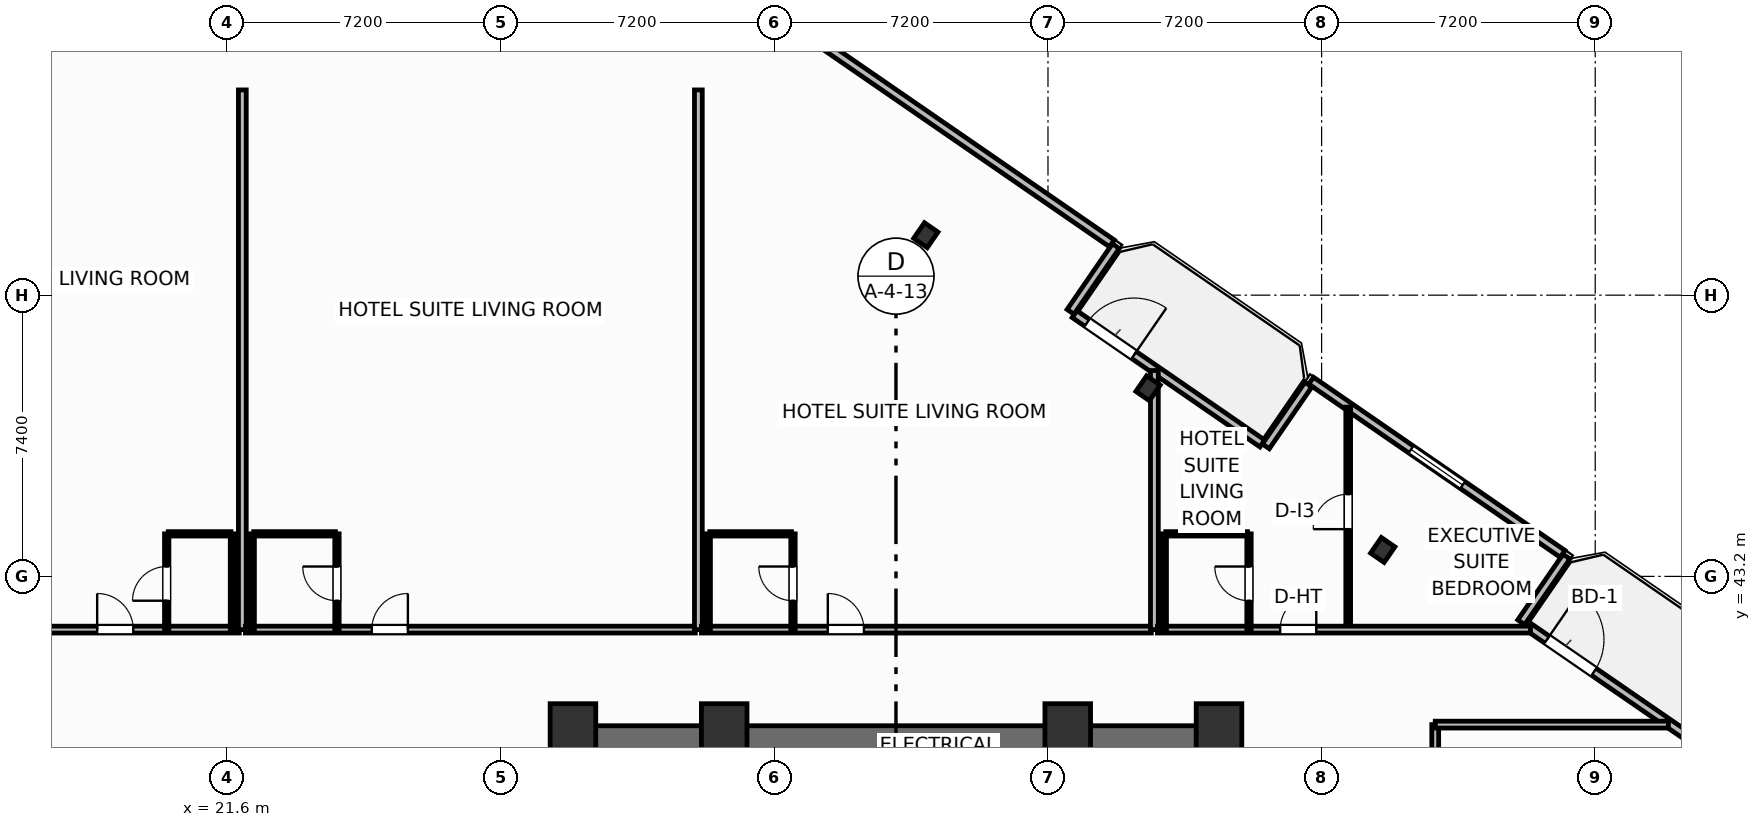
"""IFC4 building model, lengths in metres.
Left out: names, types, materials, properties, quantities, classifications, styles, units other than length and angle.
Written with IfcOpenShell. Run it as: python <this file> out.ifc"""

import sys

from ifc_helpers import new_model, si_unit, direction, frame, frame_2d, origin, origin_2d, place, context, subcontext, project, spatial, rectangle, i_section, extrude, element, fill, save


model = new_model("IFC4")
c1 = context("Model", 3, precision=1e-05, world=origin(), true_north=direction((0.0, 1.0)))
c2 = subcontext(c1, "Body", "Model", "MODEL_VIEW")
j1 = project(units=[si_unit("LENGTHUNIT", "METRE"), si_unit("PLANEANGLEUNIT", "RADIAN")], contexts=[c1])
p1 = place(None, origin())
s1 = spatial("IfcSite", under=j1, at=p1, CompositionType="ELEMENT")
p2 = place(p1, origin())
s2 = spatial("IfcBuilding", under=s1, at=p2, CompositionType="ELEMENT")
p3 = place(p2, frame((0.0, 0.0, 49.2)))
s3 = spatial("IfcBuildingStorey", under=s2, at=p3, CompositionType="ELEMENT", Elevation=49.2)
for number, where, z_axis, x_axis in (
    (1, (30.7, 39.05, 0.0), (0.0, 0.0, 1.0), (1.0, 0.0, 0.0)),
    (2, (34.68, 39.05, 0.0), (0.0, 0.0, 1.0), (1.0, 0.0, 0.0)),
    (3, (43.72, 39.05, 0.0), (0.0, 0.0, 1.0), (1.0, 0.0, 0.0)),
    (4, (47.7, 39.05, 0.0), (0.0, 0.0, 1.0), (1.0, 0.0, 0.0)),
):
    element("IfcColumn", number, at=place(p3, frame(where, z_axis=z_axis, x_axis=x_axis)), inside=s3, PredefinedType="COLUMN", context=c2, shape_type="SweptSolid", body=[
        extrude(rectangle(XDim=1.2, YDim=1.6, at=origin_2d()), origin(), (0.0, 0.0, 1.0), 3.7),
    ])
p4 = place(p3, frame((30.28, 38.845, 0.0), z_axis=(0.0, 0.0, 1.0), x_axis=(1.0, 0.0, 0.0)))
e5 = element("IfcWall", 5, at=p4, inside=s3, PredefinedType="SHEAR", context=c2, shape_type="SweptSolid", body=[
    extrude(rectangle(XDim=17.84, YDim=0.85, at=frame_2d((8.92, 0.0))), origin(), (0.0, 0.0, 1.0), 3.45),
])
for number, where, z_axis, x_axis in (
    (6, (52.009, 43.896, 0.0), (0.0, 0.0, 1.0), (0.824, -0.567, 0.0)),
    (7, (45.833, 48.15, 0.0), (0.0, 0.0, 1.0), (0.824, -0.567, 0.0)),
    (8, (39.985, 52.177, 0.0), (0.0, 0.0, 1.0), (0.824, -0.567, 0.0)),
):
    element("IfcColumn", number, at=place(p3, frame(where, z_axis=z_axis, x_axis=x_axis)), inside=s3, PredefinedType="COLUMN", context=c2, shape_type="SweptSolid", body=[
        extrude(i_section(OverallWidth=0.432, OverallDepth=0.498, WebThickness=0.056, FlangeThickness=0.089, FilletRadius=0.025, at=origin_2d()), origin(), (0.0, 0.0, 1.0), 3.7),
    ])
p5 = place(p3, frame((43.898, 50.102, 0.0), z_axis=(0.0, 0.0, 1.0), x_axis=(0.823534636215, -0.567265989598, 0.0)))
e9 = element("IfcWall", 9, at=p5, inside=s3, PredefinedType="SOLIDWALL", context=c2, shape_type="SweptSolid", body=[
    extrude(rectangle(XDim=6.0, YDim=0.22, at=frame_2d((3.0, 0.0))), origin(), (0.0, 0.0, 1.0), 2.73),
])
p6 = place(p5, frame((0.4, 0.0, 0.0)))
e10 = element("IfcOpeningElement", 10, at=p6, cuts=e9, PredefinedType="OPENING", context=c2, shape_type="SweptSolid", body=[
    extrude(rectangle(XDim=1.5, YDim=2.25, at=frame_2d((0.75, 1.125))), frame((0.0, 0.12, 0.0), z_axis=(0.0, -1.0, 0.0), x_axis=(1.0, 0.0, 0.0)), (0.0, 0.0, 1.0), 0.24),
])
p7 = place(p3, frame((55.757, 41.933, 0.0), z_axis=(0.0, 0.0, 1.0), x_axis=(0.823534636215, -0.567265989598, 0.0)))
e11 = element("IfcWall", 11, at=p7, inside=s3, PredefinedType="SOLIDWALL", context=c2, shape_type="SweptSolid", body=[
    extrude(rectangle(XDim=6.0, YDim=0.22, at=frame_2d((3.0, 0.0))), origin(), (0.0, 0.0, 1.0), 2.73),
])
p8 = place(p7, frame((0.696, 0.0, 0.0)))
e12 = element("IfcOpeningElement", 12, at=p8, cuts=e11, PredefinedType="OPENING", context=c2, shape_type="SweptSolid", body=[
    extrude(rectangle(XDim=1.5, YDim=2.25, at=frame_2d((0.75, 1.125))), frame((0.0, 0.12, 0.0), z_axis=(0.0, -1.0, 0.0), x_axis=(1.0, 0.0, 0.0)), (0.0, 0.0, 1.0), 0.24),
])
p9 = place(p3, frame((55.653, 41.993, 0.0), z_axis=(0.0, 0.0, 1.0), x_axis=(0.567273696173, 0.823529327729, 0.0)))
e13 = element("IfcWall", 13, at=p9, inside=s3, PredefinedType="SOLIDWALL", context=c2, shape_type="SweptSolid", body=[
    extrude(rectangle(XDim=2.1, YDim=0.22, at=frame_2d((1.05, 0.0))), origin(), (0.0, 0.0, 1.0), 2.73),
])
p10 = place(p3, frame((56.741, 43.793, 0.0), z_axis=(0.0, 0.0, 1.0), x_axis=(-0.823530942962, 0.56727135128, 0.0)))
e14 = element("IfcWall", 14, at=p10, inside=s3, PredefinedType="SOLIDWALL", context=c2, shape_type="SweptSolid", body=[
    extrude(rectangle(XDim=8.035, YDim=0.22, at=frame_2d((4.018, 0.0))), origin(), (0.0, 0.0, 1.0), 2.73),
])
p11 = place(p10, frame((3.192, 0.0, 0.8)))
e15 = element("IfcOpeningElement", 15, at=p11, cuts=e14, PredefinedType="OPENING", context=c2, shape_type="SweptSolid", body=[
    extrude(rectangle(XDim=1.65, YDim=1.65, at=frame_2d((0.825, 0.825))), frame((0.0, 0.12, 0.0), z_axis=(0.0, -1.0, 0.0), x_axis=(1.0, 0.0, 0.0)), (0.0, 0.0, 1.0), 0.24),
])
p12 = place(p3, frame((50.053, 48.248, 0.0), z_axis=(0.0, 0.0, 1.0), x_axis=(-0.567273565974, -0.823529417415, 0.0)))
e16 = element("IfcWall", 16, at=p12, inside=s3, PredefinedType="SOLIDWALL", context=c2, shape_type="SweptSolid", body=[
    extrude(rectangle(XDim=1.975, YDim=0.22, at=frame_2d((0.988, 0.0))), origin(), (0.0, 0.0, 1.0), 2.73),
])
p13 = place(p3, frame((43.794, 50.161, 0.0), z_axis=(0.0, 0.0, 1.0), x_axis=(0.567352541689, 0.823475010816, 0.0)))
e17 = element("IfcWall", 17, at=p13, inside=s3, PredefinedType="SOLIDWALL", context=c2, shape_type="SweptSolid", body=[
    extrude(rectangle(XDim=2.1, YDim=0.22, at=frame_2d((1.05, 0.0))), origin(), (0.0, 0.0, 1.0), 2.73),
])
p14 = place(p3, frame((44.882, 51.962, 0.0), z_axis=(0.0, 0.0, 1.0), x_axis=(-0.823534427573, 0.567266292497, 0.0)))
e18 = element("IfcWall", 18, at=p14, inside=s3, PredefinedType="SOLIDWALL", context=c2, shape_type="SweptSolid", body=[
    extrude(rectangle(XDim=23.147, YDim=0.22, at=frame_2d((11.574, 0.0))), origin(), (0.0, 0.0, 1.0), 2.73),
])
p15 = place(p14, frame((10.749, 0.0, 0.8)))
e19 = element("IfcOpeningElement", 19, at=p15, cuts=e18, PredefinedType="OPENING", context=c2, shape_type="SweptSolid", body=[
    extrude(rectangle(XDim=1.65, YDim=1.65, at=frame_2d((0.825, 0.825))), frame((0.0, 0.12, 0.0), z_axis=(0.0, -1.0, 0.0), x_axis=(1.0, 0.0, 0.0)), (0.0, 0.0, 1.0), 0.24),
])
p16 = place(p3, frame((3.176, 41.8, 0.0), z_axis=(0.0, 0.0, 1.0), x_axis=(1.0, 0.0, 0.0)))
e20 = element("IfcWall", 20, at=p16, inside=s3, PredefinedType="PARTITIONING", context=c2, shape_type="SweptSolid", body=[
    extrude(rectangle(XDim=18.744, YDim=0.18, at=frame_2d((9.372, 0.0))), origin(), (0.0, 0.0, 1.0), 3.45),
])
p17 = place(p16, frame((15.004, 0.0, 0.0)))
e21 = element("IfcOpeningElement", 21, at=p17, cuts=e20, PredefinedType="OPENING", context=c2, shape_type="SweptSolid", body=[
    extrude(rectangle(XDim=0.95, YDim=2.15, at=frame_2d((0.475, 1.075))), frame((0.0, 0.1, 0.0), z_axis=(0.0, -1.0, 0.0), x_axis=(1.0, 0.0, 0.0)), (0.0, 0.0, 1.0), 0.2),
])
p18 = place(p3, frame((20.05, 44.32, 0.0), z_axis=(0.0, 0.0, 1.0), x_axis=(1.0, 0.0, 0.0)))
e22 = element("IfcWall", 22, at=p18, inside=s3, PredefinedType="PARTITIONING", context=c2, shape_type="SweptSolid", body=[
    extrude(rectangle(XDim=1.65, YDim=0.115, at=frame_2d((0.825, 0.0))), origin(), (0.0, 0.0, 1.0), 3.45),
])
p19 = place(p3, frame((20.01, 41.8, 0.0), z_axis=(0.0, 0.0, 1.0), x_axis=(0.0, 1.0, 0.0)))
e23 = element("IfcWall", 23, at=p19, inside=s3, PredefinedType="PARTITIONING", context=c2, shape_type="SweptSolid", body=[
    extrude(rectangle(XDim=2.52, YDim=0.115, at=frame_2d((1.26, 0.0))), origin(), (0.0, 0.0, 1.0), 3.45),
])
p20 = place(p19, frame((0.76, 0.0, 0.0)))
e24 = element("IfcOpeningElement", 24, at=p20, cuts=e23, PredefinedType="OPENING", context=c2, shape_type="SweptSolid", body=[
    extrude(rectangle(XDim=0.9, YDim=2.05, at=frame_2d((0.45, 1.025))), frame((0.0, 0.067, 0.0), z_axis=(0.0, -1.0, 0.0), x_axis=(1.0, 0.0, 0.0)), (0.0, 0.0, 1.0), 0.135),
])
p21 = place(p3, frame((21.74, 41.8, 0.0), z_axis=(0.0, 0.0, 1.0), x_axis=(0.0, 1.0, 0.0)))
e25 = element("IfcWall", 25, at=p21, inside=s3, PredefinedType="PARTITIONING", context=c2, shape_type="SweptSolid", body=[
    extrude(rectangle(XDim=2.52, YDim=0.115, at=frame_2d((1.26, 0.0))), origin(), (0.0, 0.0, 1.0), 3.45),
])
p22 = place(p3, frame((22.0, 41.8, 0.0), z_axis=(0.0, 0.0, 1.0), x_axis=(0.0, 1.0, 0.0)))
e26 = element("IfcWall", 26, at=p22, inside=s3, PredefinedType="PARTITIONING", context=c2, shape_type="SweptSolid", body=[
    extrude(rectangle(XDim=14.2, YDim=0.205, at=frame_2d((7.1, 0.0))), origin(), (0.0, 0.0, 1.0), 3.45),
])
p23 = place(p3, frame((22.08, 41.8, 0.0), z_axis=(0.0, 0.0, 1.0), x_axis=(1.0, 0.0, 0.0)))
e27 = element("IfcWall", 27, at=p23, inside=s3, PredefinedType="PARTITIONING", context=c2, shape_type="SweptSolid", body=[
    extrude(rectangle(XDim=11.84, YDim=0.18, at=frame_2d((5.92, 0.0))), origin(), (0.0, 0.0, 1.0), 3.45),
])
p24 = place(p23, frame((3.326, 0.0, 0.0)))
e28 = element("IfcOpeningElement", 28, at=p24, cuts=e27, PredefinedType="OPENING", context=c2, shape_type="SweptSolid", body=[
    extrude(rectangle(XDim=0.95, YDim=2.15, at=frame_2d((0.475, 1.075))), frame((0.0, 0.1, 0.0), z_axis=(0.0, -1.0, 0.0), x_axis=(1.0, 0.0, 0.0)), (0.0, 0.0, 1.0), 0.2),
])
p25 = place(p3, frame((22.3, 44.32, 0.0), z_axis=(0.0, 0.0, 1.0), x_axis=(1.0, 0.0, 0.0)))
e29 = element("IfcWall", 29, at=p25, inside=s3, PredefinedType="PARTITIONING", context=c2, shape_type="SweptSolid", body=[
    extrude(rectangle(XDim=2.15, YDim=0.115, at=frame_2d((1.075, 0.0))), origin(), (0.0, 0.0, 1.0), 3.45),
])
p26 = place(p3, frame((24.49, 41.8, 0.0), z_axis=(0.0, 0.0, 1.0), x_axis=(0.0, 1.0, 0.0)))
e30 = element("IfcWall", 30, at=p26, inside=s3, PredefinedType="PARTITIONING", context=c2, shape_type="SweptSolid", body=[
    extrude(rectangle(XDim=2.52, YDim=0.115, at=frame_2d((1.26, 0.0))), origin(), (0.0, 0.0, 1.0), 3.45),
])
p27 = place(p26, frame((0.76, 0.0, 0.0)))
e31 = element("IfcOpeningElement", 31, at=p27, cuts=e30, PredefinedType="OPENING", context=c2, shape_type="SweptSolid", body=[
    extrude(rectangle(XDim=0.9, YDim=2.05, at=frame_2d((0.45, 1.025))), frame((0.0, 0.067, 0.0), z_axis=(0.0, -1.0, 0.0), x_axis=(1.0, 0.0, 0.0)), (0.0, 0.0, 1.0), 0.135),
])
p28 = place(p3, frame((22.26, 41.8, 0.0), z_axis=(0.0, 0.0, 1.0), x_axis=(0.0, 1.0, 0.0)))
e32 = element("IfcWall", 32, at=p28, inside=s3, PredefinedType="PARTITIONING", context=c2, shape_type="SweptSolid", body=[
    extrude(rectangle(XDim=2.52, YDim=0.115, at=frame_2d((1.26, 0.0))), origin(), (0.0, 0.0, 1.0), 3.45),
])
p29 = place(p3, frame((34.0, 41.8, 0.0), z_axis=(0.0, 0.0, 1.0), x_axis=(0.0, 1.0, 0.0)))
e33 = element("IfcWall", 33, at=p29, inside=s3, PredefinedType="PARTITIONING", context=c2, shape_type="SweptSolid", body=[
    extrude(rectangle(XDim=14.2, YDim=0.205, at=frame_2d((7.1, 0.0))), origin(), (0.0, 0.0, 1.0), 3.45),
])
p30 = place(p3, frame((34.08, 41.8, 0.0), z_axis=(0.0, 0.0, 1.0), x_axis=(1.0, 0.0, 0.0)))
e34 = element("IfcWall", 34, at=p30, inside=s3, PredefinedType="PARTITIONING", context=c2, shape_type="SweptSolid", body=[
    extrude(rectangle(XDim=11.84, YDim=0.18, at=frame_2d((5.92, 0.0))), origin(), (0.0, 0.0, 1.0), 3.45),
])
p31 = place(p30, frame((3.326, 0.0, 0.0)))
e35 = element("IfcOpeningElement", 35, at=p31, cuts=e34, PredefinedType="OPENING", context=c2, shape_type="SweptSolid", body=[
    extrude(rectangle(XDim=0.95, YDim=2.15, at=frame_2d((0.475, 1.075))), frame((0.0, 0.1, 0.0), z_axis=(0.0, -1.0, 0.0), x_axis=(1.0, 0.0, 0.0)), (0.0, 0.0, 1.0), 0.2),
])
p32 = place(p3, frame((34.3, 44.32, 0.0), z_axis=(0.0, 0.0, 1.0), x_axis=(1.0, 0.0, 0.0)))
e36 = element("IfcWall", 36, at=p32, inside=s3, PredefinedType="PARTITIONING", context=c2, shape_type="SweptSolid", body=[
    extrude(rectangle(XDim=2.15, YDim=0.115, at=frame_2d((1.075, 0.0))), origin(), (0.0, 0.0, 1.0), 3.45),
])
p33 = place(p3, frame((36.49, 41.8, 0.0), z_axis=(0.0, 0.0, 1.0), x_axis=(0.0, 1.0, 0.0)))
e37 = element("IfcWall", 37, at=p33, inside=s3, PredefinedType="PARTITIONING", context=c2, shape_type="SweptSolid", body=[
    extrude(rectangle(XDim=2.52, YDim=0.115, at=frame_2d((1.26, 0.0))), origin(), (0.0, 0.0, 1.0), 3.45),
])
p34 = place(p33, frame((0.76, 0.0, 0.0)))
e38 = element("IfcOpeningElement", 38, at=p34, cuts=e37, PredefinedType="OPENING", context=c2, shape_type="SweptSolid", body=[
    extrude(rectangle(XDim=0.9, YDim=2.05, at=frame_2d((0.45, 1.025))), frame((0.0, 0.067, 0.0), z_axis=(0.0, -1.0, 0.0), x_axis=(1.0, 0.0, 0.0)), (0.0, 0.0, 1.0), 0.135),
])
p35 = place(p3, frame((34.26, 41.8, 0.0), z_axis=(0.0, 0.0, 1.0), x_axis=(0.0, 1.0, 0.0)))
e39 = element("IfcWall", 39, at=p35, inside=s3, PredefinedType="PARTITIONING", context=c2, shape_type="SweptSolid", body=[
    extrude(rectangle(XDim=2.52, YDim=0.115, at=frame_2d((1.26, 0.0))), origin(), (0.0, 0.0, 1.0), 3.45),
])
p36 = place(p3, frame((46.0, 41.8, 0.0), z_axis=(0.0, 0.0, 1.0), x_axis=(0.0, 1.0, 0.0)))
e40 = element("IfcWall", 40, at=p36, inside=s3, PredefinedType="PARTITIONING", context=c2, shape_type="SweptSolid", body=[
    extrude(rectangle(XDim=6.817, YDim=0.205, at=frame_2d((3.409, 0.0))), origin(), (0.0, 0.0, 1.0), 2.58),
])
p37 = place(p3, frame((51.1, 41.8, 0.0), z_axis=(0.0, 0.0, 1.0), x_axis=(0.0, 1.0, 0.0)))
e41 = element("IfcWall", 41, at=p37, inside=s3, PredefinedType="PARTITIONING", context=c2, shape_type="SweptSolid", body=[
    extrude(rectangle(XDim=5.854, YDim=0.125, at=frame_2d((2.927, 0.0))), origin(), (0.0, 0.0, 1.0), 3.45),
])
p38 = place(p37, frame((2.643, 0.0, 0.0)))
e42 = element("IfcOpeningElement", 42, at=p38, cuts=e41, PredefinedType="OPENING", context=c2, shape_type="SweptSolid", body=[
    extrude(rectangle(XDim=0.92, YDim=2.05, at=frame_2d((0.46, 1.025))), frame((0.0, 0.073, 0.0), z_axis=(0.0, -1.0, 0.0), x_axis=(1.0, 0.0, 0.0)), (0.0, 0.0, 1.0), 0.145),
])
p39 = place(p3, frame((46.08, 41.8, 0.0), z_axis=(0.0, 0.0, 1.0), x_axis=(1.0, 0.0, 0.0)))
e43 = element("IfcWall", 43, at=p39, inside=s3, PredefinedType="PARTITIONING", context=c2, shape_type="SweptSolid", body=[
    extrude(rectangle(XDim=9.817, YDim=0.18, at=frame_2d((4.908, 0.0))), origin(), (0.0, 0.0, 1.0), 3.45),
])
p40 = place(p39, frame((3.23, 0.0, 0.0)))
e44 = element("IfcOpeningElement", 44, at=p40, cuts=e43, PredefinedType="OPENING", context=c2, shape_type="SweptSolid", body=[
    extrude(rectangle(XDim=0.95, YDim=2.15, at=frame_2d((0.475, 1.075))), frame((0.0, 0.1, 0.0), z_axis=(0.0, -1.0, 0.0), x_axis=(1.0, 0.0, 0.0)), (0.0, 0.0, 1.0), 0.2),
])
p41 = place(p3, frame((46.3, 44.32, 0.0), z_axis=(0.0, 0.0, 1.0), x_axis=(1.0, 0.0, 0.0)))
e45 = element("IfcWall", 45, at=p41, inside=s3, PredefinedType="PARTITIONING", context=c2, shape_type="SweptSolid", body=[
    extrude(rectangle(XDim=2.15, YDim=0.115, at=frame_2d((1.075, 0.0))), origin(), (0.0, 0.0, 1.0), 3.45),
])
p42 = place(p3, frame((48.49, 41.8, 0.0), z_axis=(0.0, 0.0, 1.0), x_axis=(0.0, 1.0, 0.0)))
e46 = element("IfcWall", 46, at=p42, inside=s3, PredefinedType="PARTITIONING", context=c2, shape_type="SweptSolid", body=[
    extrude(rectangle(XDim=2.52, YDim=0.115, at=frame_2d((1.26, 0.0))), origin(), (0.0, 0.0, 1.0), 3.45),
])
p43 = place(p42, frame((0.76, 0.0, 0.0)))
e47 = element("IfcOpeningElement", 47, at=p43, cuts=e46, PredefinedType="OPENING", context=c2, shape_type="SweptSolid", body=[
    extrude(rectangle(XDim=0.9, YDim=2.05, at=frame_2d((0.45, 1.025))), frame((0.0, 0.067, 0.0), z_axis=(0.0, -1.0, 0.0), x_axis=(1.0, 0.0, 0.0)), (0.0, 0.0, 1.0), 0.135),
])
p44 = place(p3, frame((46.26, 41.8, 0.0), z_axis=(0.0, 0.0, 1.0), x_axis=(0.0, 1.0, 0.0)))
e48 = element("IfcWall", 48, at=p44, inside=s3, PredefinedType="PARTITIONING", context=c2, shape_type="SweptSolid", body=[
    extrude(rectangle(XDim=2.52, YDim=0.115, at=frame_2d((1.26, 0.0))), origin(), (0.0, 0.0, 1.0), 3.45),
])
p45 = place(p3, frame((53.39, 19.24, 0.0), z_axis=(0.0, 0.0, 1.0), x_axis=(0.0, 1.0, 0.0)))
e49 = element("IfcWall", 49, at=p45, inside=s3, PredefinedType="PARTITIONING", context=c2, shape_type="SweptSolid", body=[
    extrude(rectangle(XDim=20.06, YDim=0.18, at=frame_2d((10.03, 0.0))), origin(), (0.0, 0.0, 1.0), 3.45),
])
p46 = place(p45, frame((7.7, 0.0, 0.0)))
e50 = element("IfcOpeningElement", 50, at=p46, cuts=e49, PredefinedType="OPENING", context=c2, shape_type="SweptSolid", body=[
    extrude(rectangle(XDim=0.95, YDim=2.05, at=frame_2d((0.475, 1.025))), frame((0.0, 0.1, 0.0), z_axis=(0.0, -1.0, 0.0), x_axis=(1.0, 0.0, 0.0)), (0.0, 0.0, 1.0), 0.2),
])
p47 = place(p3, frame((53.39, 39.3, 0.0), z_axis=(0.0, 0.0, 1.0), x_axis=(1.0, 0.0, 0.0)))
e51 = element("IfcWall", 51, at=p47, inside=s3, PredefinedType="PARTITIONING", context=c2, shape_type="SweptSolid", body=[
    extrude(rectangle(XDim=6.136, YDim=0.18, at=frame_2d((3.068, 0.0))), origin(), (0.0, 0.0, 1.0), 3.45),
])
p48 = place(p6, origin())
e52 = element("IfcDoor", 52, at=p48, inside=s3, OperationType="SINGLE_SWING_RIGHT", PredefinedType="DOOR", context=c2, shape_type="SweptSolid", body=[
    extrude(rectangle(XDim=1.5, YDim=2.25, at=frame_2d((0.75, 1.125))), frame((0.0, 0.025, 0.0), z_axis=(0.0, -1.0, 0.0), x_axis=(1.0, 0.0, 0.0)), (0.0, 0.0, 1.0), 0.05),
])
fill(e10, e52)
p49 = place(p8, origin())
e53 = element("IfcDoor", 53, at=p49, inside=s3, OperationType="SINGLE_SWING_LEFT", PredefinedType="DOOR", context=c2, shape_type="SweptSolid", body=[
    extrude(rectangle(XDim=1.5, YDim=2.25, at=frame_2d((0.75, 1.125))), frame((0.0, 0.025, 0.0), z_axis=(0.0, -1.0, 0.0), x_axis=(1.0, 0.0, 0.0)), (0.0, 0.0, 1.0), 0.05),
])
fill(e12, e53)
p50 = place(p11, origin())
e54 = element("IfcWindow", 54, at=p50, inside=s3, PartitioningType="SINGLE_PANEL", PredefinedType="WINDOW", context=c2, shape_type="SweptSolid", body=[
    extrude(rectangle(XDim=1.65, YDim=1.65, at=frame_2d((0.825, 0.825))), frame((0.0, 0.03, 0.0), z_axis=(0.0, -1.0, 0.0), x_axis=(1.0, 0.0, 0.0)), (0.0, 0.0, 1.0), 0.06),
])
fill(e15, e54)
p51 = place(p17, origin())
e55 = element("IfcDoor", 55, at=p51, inside=s3, OperationType="SINGLE_SWING_LEFT", PredefinedType="DOOR", context=c2, shape_type="SweptSolid", body=[
    extrude(rectangle(XDim=0.95, YDim=2.15, at=frame_2d((0.475, 1.075))), frame((0.0, 0.025, 0.0), z_axis=(0.0, -1.0, 0.0), x_axis=(1.0, 0.0, 0.0)), (0.0, 0.0, 1.0), 0.05),
])
fill(e21, e55)
p52 = place(p20, origin())
e56 = element("IfcDoor", 56, at=p52, inside=s3, OperationType="SINGLE_SWING_LEFT", PredefinedType="DOOR", context=c2, shape_type="SweptSolid", body=[
    extrude(rectangle(XDim=0.9, YDim=2.05, at=frame_2d((0.45, 1.025))), frame((0.0, 0.025, 0.0), z_axis=(0.0, -1.0, 0.0), x_axis=(1.0, 0.0, 0.0)), (0.0, 0.0, 1.0), 0.05),
])
fill(e24, e56)
p53 = place(p24, origin())
e57 = element("IfcDoor", 57, at=p53, inside=s3, OperationType="SINGLE_SWING_RIGHT", PredefinedType="DOOR", context=c2, shape_type="SweptSolid", body=[
    extrude(rectangle(XDim=0.95, YDim=2.15, at=frame_2d((0.475, 1.075))), frame((0.0, 0.025, 0.0), z_axis=(0.0, -1.0, 0.0), x_axis=(1.0, 0.0, 0.0)), (0.0, 0.0, 1.0), 0.05),
])
fill(e28, e57)
p54 = place(p27, origin())
e58 = element("IfcDoor", 58, at=p54, inside=s3, OperationType="SINGLE_SWING_RIGHT", PredefinedType="DOOR", context=c2, shape_type="SweptSolid", body=[
    extrude(rectangle(XDim=0.9, YDim=2.05, at=frame_2d((0.45, 1.025))), frame((0.0, 0.025, 0.0), z_axis=(0.0, -1.0, 0.0), x_axis=(1.0, 0.0, 0.0)), (0.0, 0.0, 1.0), 0.05),
])
fill(e31, e58)
p55 = place(p31, origin())
e59 = element("IfcDoor", 59, at=p55, inside=s3, OperationType="SINGLE_SWING_LEFT", PredefinedType="DOOR", context=c2, shape_type="SweptSolid", body=[
    extrude(rectangle(XDim=0.95, YDim=2.15, at=frame_2d((0.475, 1.075))), frame((0.0, 0.025, 0.0), z_axis=(0.0, -1.0, 0.0), x_axis=(1.0, 0.0, 0.0)), (0.0, 0.0, 1.0), 0.05),
])
fill(e35, e59)
p56 = place(p34, origin())
e60 = element("IfcDoor", 60, at=p56, inside=s3, OperationType="SINGLE_SWING_RIGHT", PredefinedType="DOOR", context=c2, shape_type="SweptSolid", body=[
    extrude(rectangle(XDim=0.9, YDim=2.05, at=frame_2d((0.45, 1.025))), frame((0.0, 0.025, 0.0), z_axis=(0.0, -1.0, 0.0), x_axis=(1.0, 0.0, 0.0)), (0.0, 0.0, 1.0), 0.05),
])
fill(e38, e60)
p57 = place(p38, origin())
e61 = element("IfcDoor", 61, at=p57, inside=s3, OperationType="SINGLE_SWING_LEFT", PredefinedType="DOOR", context=c2, shape_type="SweptSolid", body=[
    extrude(rectangle(XDim=0.92, YDim=2.05, at=frame_2d((0.46, 1.025))), frame((0.0, 0.025, 0.0), z_axis=(0.0, -1.0, 0.0), x_axis=(1.0, 0.0, 0.0)), (0.0, 0.0, 1.0), 0.05),
])
fill(e42, e61)
p58 = place(p40, origin())
e62 = element("IfcDoor", 62, at=p58, inside=s3, OperationType="SINGLE_SWING_RIGHT", PredefinedType="DOOR", context=c2, shape_type="SweptSolid", body=[
    extrude(rectangle(XDim=0.95, YDim=2.15, at=frame_2d((0.475, 1.075))), frame((0.0, 0.025, 0.0), z_axis=(0.0, -1.0, 0.0), x_axis=(1.0, 0.0, 0.0)), (0.0, 0.0, 1.0), 0.05),
])
fill(e44, e62)
p59 = place(p43, origin())
e63 = element("IfcDoor", 63, at=p59, inside=s3, OperationType="SINGLE_SWING_RIGHT", PredefinedType="DOOR", context=c2, shape_type="SweptSolid", body=[
    extrude(rectangle(XDim=0.9, YDim=2.05, at=frame_2d((0.45, 1.025))), frame((0.0, 0.025, 0.0), z_axis=(0.0, -1.0, 0.0), x_axis=(1.0, 0.0, 0.0)), (0.0, 0.0, 1.0), 0.05),
])
fill(e47, e63)
save(model, sys.argv[1])
